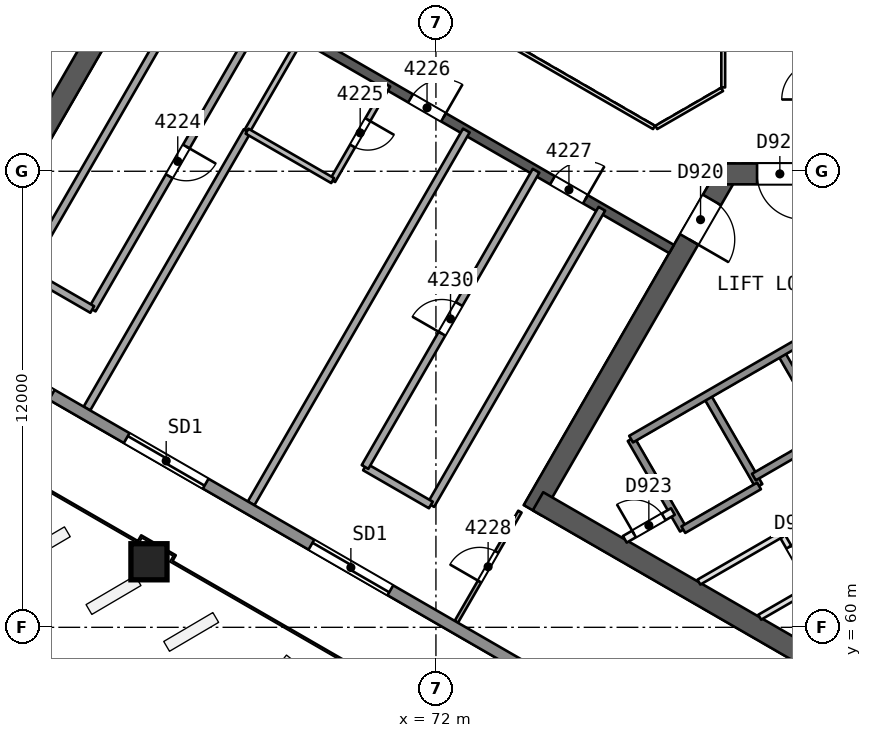
"""IFC4 building model, lengths in metres.
Left out: names, types, materials, properties, quantities, classifications, styles, units other than length and angle.
Written with IfcOpenShell. Run it as: python <this file> out.ifc"""

import sys

from ifc_helpers import new_model, si_unit, direction, frame, frame_2d, origin, origin_2d, place, context, subcontext, project, spatial, rectangle, extrude, element, fill, save


model = new_model("IFC4")
c1 = context("Model", 3, precision=1e-05, world=origin(), true_north=direction((0.0, 1.0)))
c2 = subcontext(c1, "Body", "Model", "MODEL_VIEW")
j1 = project(units=[si_unit("LENGTHUNIT", "METRE"), si_unit("PLANEANGLEUNIT", "RADIAN")], contexts=[c1])
p1 = place(None, origin())
s1 = spatial("IfcSite", under=j1, at=p1, CompositionType="ELEMENT")
p2 = place(p1, origin())
s2 = spatial("IfcBuilding", under=s1, at=p2, CompositionType="ELEMENT")
p3 = place(p2, frame((0.0, 0.0, 174.8)))
s3 = spatial("IfcBuildingStorey", under=s2, at=p3, CompositionType="ELEMENT", Elevation=174.8)
p4 = place(p3, frame((60.709, 71.386, 0.0), z_axis=(0.0, 0.0, 1.0), x_axis=(0.500015938302, 0.866016201606, 0.0)))
e1 = element("IfcWall", 1, at=p4, inside=s3, PredefinedType="SHEAR", context=c2, shape_type="SweptSolid", body=[
    extrude(rectangle(XDim=10.105, YDim=0.55, at=frame_2d((5.053, 0.0))), origin(), (0.0, 0.0, 1.0), 3.7),
])
p5 = place(p4, frame((7.955, 0.0, 0.0)))
e2 = element("IfcOpeningElement", 2, at=p5, cuts=e1, PredefinedType="OPENING", context=c2, shape_type="SweptSolid", body=[
    extrude(rectangle(XDim=1.2, YDim=2.1, at=frame_2d((0.6, 1.05))), frame((0.0, 0.286, 0.0), z_axis=(0.0, -1.0, 0.0), x_axis=(1.0, 0.0, 0.0)), (0.0, 0.0, 1.0), 0.571),
])
p6 = place(p3, frame((79.659, 71.931, 0.0), z_axis=(0.0, 0.0, 1.0), x_axis=(-0.500000202252, -0.866025287014, 0.0)))
e3 = element("IfcWall", 3, at=p6, inside=s3, PredefinedType="SHEAR", context=c2, shape_type="SweptSolid", body=[
    extrude(rectangle(XDim=10.221, YDim=0.55, at=frame_2d((5.111, 0.0))), origin(), (0.0, 0.0, 1.0), 3.7),
])
p7 = place(p6, frame((0.791, 0.0, 0.0)))
e4 = element("IfcOpeningElement", 4, at=p7, cuts=e3, PredefinedType="OPENING", context=c2, shape_type="SweptSolid", body=[
    extrude(rectangle(XDim=1.2, YDim=2.1, at=frame_2d((0.6, 1.05))), frame((0.0, 0.286, 0.0), z_axis=(0.0, -1.0, 0.0), x_axis=(1.0, 0.0, 0.0)), (0.0, 0.0, 1.0), 0.571),
])
p8 = place(p3, frame((74.686, 63.317, 0.0), z_axis=(0.0, 0.0, 1.0), x_axis=(0.866024505738, -0.500001555459, 0.0)))
e5 = element("IfcWall", 5, at=p8, inside=s3, PredefinedType="SHEAR", context=c2, shape_type="SweptSolid", body=[
    extrude(rectangle(XDim=14.059, YDim=0.55, at=frame_2d((7.029, 0.0))), origin(), (0.0, 0.0, 1.0), 3.7),
])
p9 = place(p3, frame((89.605, 71.931, 0.0), z_axis=(0.0, 0.0, 1.0), x_axis=(-1.0, 0.0, 0.0)))
e6 = element("IfcWall", 6, at=p9, inside=s3, PredefinedType="SHEAR", context=c2, shape_type="SweptSolid", body=[
    extrude(rectangle(XDim=10.105, YDim=0.55, at=frame_2d((5.052, 0.0))), origin(), (0.0, 0.0, 1.0), 3.7),
])
p10 = place(p9, frame((7.955, 0.0, 0.0)))
e7 = element("IfcOpeningElement", 7, at=p10, cuts=e6, PredefinedType="OPENING", context=c2, shape_type="SweptSolid", body=[
    extrude(rectangle(XDim=1.2, YDim=2.1, at=frame_2d((0.6, 1.05))), frame((0.0, 0.286, 0.0), z_axis=(0.0, -1.0, 0.0), x_axis=(1.0, 0.0, 0.0)), (0.0, 0.0, 1.0), 0.571),
])
p11 = place(p3, frame((64.7, 77.748, 0.0), z_axis=(0.0, 0.0, 1.0), x_axis=(0.866026492143, -0.499998114903, 0.0)))
e8 = element("IfcWall", 8, at=p11, inside=s3, PredefinedType="SHEAR", context=c2, shape_type="SweptSolid", body=[
    extrude(rectangle(XDim=15.588, YDim=0.25, at=frame_2d((7.794, 0.0))), origin(), (0.0, 0.0, 1.0), 3.25),
])
p12 = place(p11, frame((1.682, 0.0, 0.0)))
e9 = element("IfcOpeningElement", 9, at=p12, cuts=e8, PredefinedType="OPENING", context=c2, shape_type="SweptSolid", body=[
    extrude(rectangle(XDim=1.0, YDim=2.1, at=frame_2d((0.5, 1.05))), frame((0.0, 0.135, 0.0), z_axis=(0.0, -1.0, 0.0), x_axis=(1.0, 0.0, 0.0)), (0.0, 0.0, 1.0), 0.271),
])
p13 = place(p11, frame((7.659, 0.0, 0.0)))
e10 = element("IfcOpeningElement", 10, at=p13, cuts=e8, PredefinedType="OPENING", context=c2, shape_type="SweptSolid", body=[
    extrude(rectangle(XDim=1.0, YDim=2.1, at=frame_2d((0.5, 1.05))), frame((0.0, 0.135, 0.0), z_axis=(0.0, -1.0, 0.0), x_axis=(1.0, 0.0, 0.0)), (0.0, 0.0, 1.0), 0.271),
])
p14 = place(p11, frame((11.971, 0.0, 0.0)))
e11 = element("IfcOpeningElement", 11, at=p14, cuts=e8, PredefinedType="OPENING", context=c2, shape_type="SweptSolid", body=[
    extrude(rectangle(XDim=1.0, YDim=2.1, at=frame_2d((0.5, 1.05))), frame((0.0, 0.135, 0.0), z_axis=(0.0, -1.0, 0.0), x_axis=(1.0, 0.0, 0.0)), (0.0, 0.0, 1.0), 0.271),
])
p15 = place(p3, frame((64.437, 61.704, 0.0), z_axis=(0.010093620709, 0.017482414954, 0.999796221231), x_axis=(-0.866022643586, 0.500004780773, 1.3036e-08)))
e12 = element("IfcColumn", 12, at=p15, inside=s3, PredefinedType="COLUMN", context=c2, shape_type="SweptSolid", body=[
    extrude(rectangle(XDim=0.95, YDim=0.95, at=origin_2d()), origin(), (0.0, 0.0, 1.0), 3.701),
])
p16 = place(p3, frame((67.456, 76.157, 0.0), z_axis=(0.0, 0.0, 1.0), x_axis=(-0.499990139034, -0.866031096941, 0.0)))
e13 = element("IfcWall", 13, at=p16, inside=s3, PredefinedType="PARTITIONING", context=c2, shape_type="SweptSolid", body=[
    extrude(rectangle(XDim=9.0, YDim=0.2, at=frame_2d((4.5, 0.0))), origin(), (0.0, 0.0, 1.0), 3.25),
])
p17 = place(p16, frame((4.05, 0.0, 0.0)))
e14 = element("IfcOpeningElement", 14, at=p17, cuts=e13, PredefinedType="OPENING", context=c2, shape_type="SweptSolid", body=[
    extrude(rectangle(XDim=0.9, YDim=2.1, at=frame_2d((0.45, 1.05))), frame((0.0, 0.11, 0.0), z_axis=(0.0, -1.0, 0.0), x_axis=(1.0, 0.0, 0.0)), (0.0, 0.0, 1.0), 0.221),
])
p18 = place(p3, frame((62.956, 68.363, 0.0), z_axis=(0.0, 0.0, 1.0), x_axis=(-0.866041268327, 0.499972520799, 0.0)))
e15 = element("IfcWall", 15, at=p18, inside=s3, PredefinedType="PARTITIONING", context=c2, shape_type="SweptSolid", body=[
    extrude(rectangle(XDim=2.0, YDim=0.2, at=frame_2d((1.0, 0.0))), origin(), (0.0, 0.0, 1.0), 3.25),
])
p19 = place(p3, frame((61.224, 69.363, 0.0), z_axis=(0.0, 0.0, 1.0), x_axis=(0.499990139034, 0.866031096941, 0.0)))
e16 = element("IfcWall", 16, at=p19, inside=s3, PredefinedType="PARTITIONING", context=c2, shape_type="SweptSolid", body=[
    extrude(rectangle(XDim=9.0, YDim=0.2, at=frame_2d((4.5, 0.0))), origin(), (0.0, 0.0, 1.0), 3.25),
])
p20 = place(p3, frame((62.816, 65.756, 0.0), z_axis=(0.0, 0.0, 1.0), x_axis=(0.500002470373, 0.866023977509, 0.0)))
e17 = element("IfcWall", 17, at=p20, inside=s3, PredefinedType="PARTITIONING", context=c2, shape_type="SweptSolid", body=[
    extrude(rectangle(XDim=8.428, YDim=0.2, at=frame_2d((4.214, 0.0))), origin(), (0.0, 0.0, 1.0), 3.25),
])
p21 = place(p3, frame((67.03, 73.054, 0.0), z_axis=(0.0, 0.0, 1.0), x_axis=(0.499987231761, 0.866032775405, 0.0)))
e18 = element("IfcWall", 18, at=p21, inside=s3, PredefinedType="PARTITIONING", context=c2, shape_type="SweptSolid", body=[
    extrude(rectangle(XDim=2.9, YDim=0.15, at=frame_2d((1.45, 0.0))), origin(), (0.0, 0.0, 1.0), 3.25),
])
p22 = place(p3, frame((70.732, 74.266, 0.0), z_axis=(0.0, 0.0, 1.0), x_axis=(-0.499987231761, -0.866032775405, 0.0)))
e19 = element("IfcWall", 19, at=p22, inside=s3, PredefinedType="PARTITIONING", context=c2, shape_type="SweptSolid", body=[
    extrude(rectangle(XDim=2.9, YDim=0.15, at=frame_2d((1.45, 0.0))), origin(), (0.0, 0.0, 1.0), 3.25),
])
p23 = place(p22, frame((1.05, 0.0, 0.0)))
e20 = element("IfcOpeningElement", 20, at=p23, cuts=e19, PredefinedType="OPENING", context=c2, shape_type="SweptSolid", body=[
    extrude(rectangle(XDim=0.8, YDim=2.1, at=frame_2d((0.4, 1.05))), frame((0.0, 0.085, 0.0), z_axis=(0.0, -1.0, 0.0), x_axis=(1.0, 0.0, 0.0)), (0.0, 0.0, 1.0), 0.171),
])
p24 = place(p3, frame((69.282, 71.754, 0.0), z_axis=(0.0, 0.0, 1.0), x_axis=(-0.866021400173, 0.500006934395, 0.0)))
e21 = element("IfcWall", 21, at=p24, inside=s3, PredefinedType="PARTITIONING", context=c2, shape_type="SweptSolid", body=[
    extrude(rectangle(XDim=2.6, YDim=0.15, at=frame_2d((1.3, 0.0))), origin(), (0.0, 0.0, 1.0), 3.25),
])
p25 = place(p3, frame((67.136, 63.262, 0.0), z_axis=(0.0, 0.0, 1.0), x_axis=(0.499998569178, 0.866026229868, 0.0)))
e22 = element("IfcWall", 22, at=p25, inside=s3, PredefinedType="PARTITIONING", context=c2, shape_type="SweptSolid", body=[
    extrude(rectangle(XDim=11.328, YDim=0.2, at=frame_2d((5.664, 0.0))), origin(), (0.0, 0.0, 1.0), 3.25),
])
p26 = place(p3, frame((72.536, 60.144, 0.0), z_axis=(0.0, 0.0, 1.0), x_axis=(0.499981198768, 0.866036258409, 0.0)))
e23 = element("IfcWall", 23, at=p26, inside=s3, PredefinedType="PARTITIONING", context=c2, shape_type="SweptSolid", body=[
    extrude(rectangle(XDim=3.349, YDim=0.1, at=frame_2d((1.674, 0.0))), origin(), (0.0, 0.0, 1.0), 3.25),
])
p27 = place(p26, frame((1.224, 0.0, 0.0)))
e24 = element("IfcOpeningElement", 24, at=p27, cuts=e23, PredefinedType="OPENING", context=c2, shape_type="SweptSolid", body=[
    extrude(rectangle(XDim=0.9, YDim=2.1, at=frame_2d((0.45, 1.05))), frame((0.0, 0.061, 0.0), z_axis=(0.0, -1.0, 0.0), x_axis=(1.0, 0.0, 0.0)), (0.0, 0.0, 1.0), 0.121),
])
p28 = place(p3, frame((76.366, 71.013, 0.0), z_axis=(0.0, 0.0, 1.0), x_axis=(-0.5000018851, -0.866024315419, 0.0)))
e25 = element("IfcWall", 25, at=p28, inside=s3, PredefinedType="PARTITIONING", context=c2, shape_type="SweptSolid", body=[
    extrude(rectangle(XDim=9.0, YDim=0.2, at=frame_2d((4.5, 0.0))), origin(), (0.0, 0.0, 1.0), 3.25),
])
p29 = place(p3, frame((71.866, 63.219, 0.0), z_axis=(0.0, 0.0, 1.0), x_axis=(-0.866010750942, 0.50002537861, 0.0)))
e26 = element("IfcWall", 26, at=p29, inside=s3, PredefinedType="PARTITIONING", context=c2, shape_type="SweptSolid", body=[
    extrude(rectangle(XDim=2.0, YDim=0.2, at=frame_2d((1.0, 0.0))), origin(), (0.0, 0.0, 1.0), 3.25),
])
p30 = place(p3, frame((70.134, 64.219, 0.0), z_axis=(0.0, 0.0, 1.0), x_axis=(0.5000018851, 0.866024315419, 0.0)))
e27 = element("IfcWall", 27, at=p30, inside=s3, PredefinedType="PARTITIONING", context=c2, shape_type="SweptSolid", body=[
    extrude(rectangle(XDim=9.0, YDim=0.2, at=frame_2d((4.5, 0.0))), origin(), (0.0, 0.0, 1.0), 3.25),
])
p31 = place(p30, frame((4.05, 0.0, 0.0)))
e28 = element("IfcOpeningElement", 28, at=p31, cuts=e27, PredefinedType="OPENING", context=c2, shape_type="SweptSolid", body=[
    extrude(rectangle(XDim=0.9, YDim=2.1, at=frame_2d((0.45, 1.05))), frame((0.0, 0.11, 0.0), z_axis=(0.0, -1.0, 0.0), x_axis=(1.0, 0.0, 0.0)), (0.0, 0.0, 1.0), 0.221),
])
p32 = place(p3, frame((88.844, 50.557, 0.0), z_axis=(0.0, 0.0, 1.0), x_axis=(-0.866025382531, 0.500000036812, 0.0)))
e29 = element("IfcWall", 29, at=p32, inside=s3, PredefinedType="SOLIDWALL", context=c2, shape_type="SweptSolid", body=[
    extrude(rectangle(XDim=53.42, YDim=0.3, at=frame_2d((26.71, 0.0))), origin(), (0.0, 0.0, 1.0), 3.25),
])
p33 = place(p32, frame((31.122, 0.0, 0.0)))
e30 = element("IfcOpeningElement", 30, at=p33, cuts=e29, PredefinedType="OPENING", context=c2, shape_type="SweptSolid", body=[
    extrude(rectangle(XDim=2.4, YDim=2.4, at=frame_2d((1.2, 1.2))), frame((0.0, 0.161, 0.0), z_axis=(0.0, -1.0, 0.0), x_axis=(1.0, 0.0, 0.0)), (0.0, 0.0, 1.0), 0.321),
])
p34 = place(p32, frame((41.52, 0.0, 0.0)))
e31 = element("IfcOpeningElement", 31, at=p34, cuts=e29, PredefinedType="OPENING", context=c2, shape_type="SweptSolid", body=[
    extrude(rectangle(XDim=2.4, YDim=2.4, at=frame_2d((1.2, 1.2))), frame((0.0, 0.161, 0.0), z_axis=(0.0, -1.0, 0.0), x_axis=(1.0, 0.0, 0.0)), (0.0, 0.0, 1.0), 0.321),
])
p35 = place(p32, frame((20.834, 0.0, 0.0)))
e32 = element("IfcOpeningElement", 32, at=p35, cuts=e29, PredefinedType="OPENING", context=c2, shape_type="SweptSolid", body=[
    extrude(rectangle(XDim=2.4, YDim=2.4, at=frame_2d((1.2, 1.2))), frame((0.0, 0.161, 0.0), z_axis=(0.0, -1.0, 0.0), x_axis=(1.0, 0.0, 0.0)), (0.0, 0.0, 1.0), 0.321),
])
p36 = place(p32, frame((9.507, 0.0, 0.0)))
e33 = element("IfcOpeningElement", 33, at=p36, cuts=e29, PredefinedType="OPENING", context=c2, shape_type="SweptSolid", body=[
    extrude(rectangle(XDim=2.4, YDim=2.4, at=frame_2d((1.2, 1.2))), frame((0.0, 0.161, 0.0), z_axis=(0.0, -1.0, 0.0), x_axis=(1.0, 0.0, 0.0)), (0.0, 0.0, 1.0), 0.321),
])
p37 = place(p32, frame((26.446, 0.0, 0.0)))
e34 = element("IfcOpeningElement", 34, at=p37, cuts=e29, PredefinedType="OPENING", context=c2, shape_type="SweptSolid", body=[
    extrude(rectangle(XDim=2.4, YDim=2.4, at=frame_2d((1.2, 1.2))), frame((0.0, 0.161, 0.0), z_axis=(0.0, -1.0, 0.0), x_axis=(1.0, 0.0, 0.0)), (0.0, 0.0, 1.0), 0.321),
])
p38 = place(p3, frame((77.135, 64.952, 0.0), z_axis=(0.0, 0.0, 1.0), x_axis=(0.499996545922, -0.866027397988, 0.0)))
e35 = element("IfcWall", 35, at=p38, inside=s3, PredefinedType="SOLIDWALL", context=c2, shape_type="SweptSolid", body=[
    extrude(rectangle(XDim=2.75, YDim=0.2, at=frame_2d((1.375, 0.0))), origin(), (0.0, 0.0, 1.0), 3.25),
])
p39 = place(p3, frame((81.094, 62.445, 0.0), z_axis=(0.0, 0.0, 1.0), x_axis=(0.499880961361, -0.866094119867, 0.0)))
e36 = element("IfcWall", 36, at=p39, inside=s3, PredefinedType="PARTITIONING", context=c2, shape_type="SweptSolid", body=[
    extrude(rectangle(XDim=1.6, YDim=0.15, at=frame_2d((0.8, 0.0))), origin(), (0.0, 0.0, 1.0), 3.25),
])
p40 = place(p39, frame((0.387, 0.0, 0.0)))
e37 = element("IfcOpeningElement", 37, at=p40, cuts=e36, PredefinedType="OPENING", context=c2, shape_type="SweptSolid", body=[
    extrude(rectangle(XDim=0.9, YDim=2.1, at=frame_2d((0.45, 1.05))), frame((0.0, 0.085, 0.0), z_axis=(0.0, -1.0, 0.0), x_axis=(1.0, 0.0, 0.0)), (0.0, 0.0, 1.0), 0.171),
])
p41 = place(p3, frame((79.127, 66.102, 0.0), z_axis=(0.0, 0.0, 1.0), x_axis=(0.499996545922, -0.866027397988, 0.0)))
e38 = element("IfcWall", 38, at=p41, inside=s3, PredefinedType="SOLIDWALL", context=c2, shape_type="SweptSolid", body=[
    extrude(rectangle(XDim=2.75, YDim=0.2, at=frame_2d((1.375, 0.0))), origin(), (0.0, 0.0, 1.0), 3.25),
])
p42 = place(p3, frame((81.076, 67.227, 0.0), z_axis=(0.0, 0.0, 1.0), x_axis=(0.50000366821, -0.866023285932, 0.0)))
e39 = element("IfcWall", 39, at=p42, inside=s3, PredefinedType="SOLIDWALL", context=c2, shape_type="SweptSolid", body=[
    extrude(rectangle(XDim=2.48, YDim=0.2, at=frame_2d((1.24, 0.0))), origin(), (0.0, 0.0, 1.0), 3.25),
])
p43 = place(p3, frame((77.135, 64.952, 0.0), z_axis=(0.0, 0.0, 1.0), x_axis=(0.866031916153, 0.499988720078, 0.0)))
e40 = element("IfcWall", 40, at=p43, inside=s3, PredefinedType="SOLIDWALL", context=c2, shape_type="SweptSolid", body=[
    extrude(rectangle(XDim=11.35, YDim=0.2, at=frame_2d((5.675, 0.0))), origin(), (0.0, 0.0, 1.0), 3.25),
])
p44 = place(p3, frame((76.97, 62.316, 0.0), z_axis=(0.0, 0.0, 1.0), x_axis=(0.865982457891, 0.500074377092, 0.0)))
e41 = element("IfcWall", 41, at=p44, inside=s3, PredefinedType="PARTITIONING", context=c2, shape_type="SweptSolid", body=[
    extrude(rectangle(XDim=1.461, YDim=0.2, at=frame_2d((0.73, 0.0))), origin(), (0.0, 0.0, 1.0), 3.25),
])
p45 = place(p44, frame((0.281, 0.0, 0.0)))
e42 = element("IfcOpeningElement", 42, at=p45, cuts=e41, PredefinedType="OPENING", context=c2, shape_type="SweptSolid", body=[
    extrude(rectangle(XDim=0.9, YDim=2.1, at=frame_2d((0.45, 1.05))), frame((0.0, 0.11, 0.0), z_axis=(0.0, -1.0, 0.0), x_axis=(1.0, 0.0, 0.0)), (0.0, 0.0, 1.0), 0.221),
])
p46 = place(p3, frame((80.367, 63.954, 0.0), z_axis=(0.0, 0.0, 1.0), x_axis=(0.866026575979, 0.499997969693, 0.0)))
e43 = element("IfcWall", 43, at=p46, inside=s3, PredefinedType="SOLIDWALL", context=c2, shape_type="SweptSolid", body=[
    extrude(rectangle(XDim=6.75, YDim=0.2, at=frame_2d((3.375, 0.0))), origin(), (0.0, 0.0, 1.0), 3.25),
])
p47 = place(p3, frame((78.51, 62.57, 0.0), z_axis=(0.0, 0.0, 1.0), x_axis=(0.866053019151, 0.499952165731, 0.0)))
e44 = element("IfcWall", 44, at=p47, inside=s3, PredefinedType="SOLIDWALL", context=c2, shape_type="SweptSolid", body=[
    extrude(rectangle(XDim=2.3, YDim=0.2, at=frame_2d((1.15, 0.0))), origin(), (0.0, 0.0, 1.0), 3.25),
])
p48 = place(p3, frame((78.92, 61.19, 0.0), z_axis=(0.0, 0.0, 1.0), x_axis=(0.866038211682, 0.499977815414, 0.0)))
e45 = element("IfcWall", 45, at=p48, inside=s3, PredefinedType="PARTITIONING", context=c2, shape_type="SweptSolid", body=[
    extrude(rectangle(XDim=2.51, YDim=0.15, at=frame_2d((1.255, 0.0))), origin(), (0.0, 0.0, 1.0), 3.25),
])
p49 = place(p3, frame((80.52, 60.266, 0.0), z_axis=(0.0, 0.0, 1.0), x_axis=(0.866008740531, 0.500028860491, 0.0)))
e46 = element("IfcWall", 46, at=p49, inside=s3, PredefinedType="PARTITIONING", context=c2, shape_type="SweptSolid", body=[
    extrude(rectangle(XDim=1.586, YDim=0.15, at=frame_2d((0.793, 0.0))), origin(), (0.0, 0.0, 1.0), 3.25),
])
for number, where, z_axis, x_axis in (
    (47, (79.56, 74.206, 0.0), (0.0, 0.0, 1.0), (0.0, 1.0, 0.0)),
    (48, (67.702, 78.948, 0.0), (0.0, 0.0, 1.0), (0.866, -0.5, 0.0)),
):
    element("IfcWall", number, at=place(p3, frame(where, z_axis=z_axis, x_axis=x_axis)), inside=s3, PredefinedType="PARTITIONING", context=c2, shape_type="SweptSolid", body=[
        extrude(rectangle(XDim=11.588, YDim=0.1, at=frame_2d((5.794, 0.0))), origin(), (0.0, 0.0, 1.0), 3.25),
    ])
p50 = place(p3, frame((77.798, 73.154, 0.0), z_axis=(0.0, 0.0, 1.0), x_axis=(0.866041268327, 0.499972520799, 0.0)))
e49 = element("IfcWall", 49, at=p50, inside=s3, PredefinedType="PARTITIONING", context=c2, shape_type="SweptSolid", body=[
    extrude(rectangle(XDim=2.0, YDim=0.1, at=frame_2d((1.0, 0.0))), origin(), (0.0, 0.0, 1.0), 3.25),
])
p51 = place(p17, origin())
e50 = element("IfcDoor", 50, at=p51, inside=s3, OperationType="SINGLE_SWING_LEFT", PredefinedType="NOTDEFINED", context=c2, shape_type="SweptSolid", body=[
    extrude(rectangle(XDim=0.9, YDim=2.1, at=frame_2d((0.45, 1.05))), frame((0.0, 0.025, 0.0), z_axis=(0.0, -1.0, 0.0), x_axis=(1.0, 0.0, 0.0)), (0.0, 0.0, 1.0), 0.05),
])
fill(e14, e50)
p52 = place(p23, origin())
e51 = element("IfcDoor", 51, at=p52, inside=s3, OperationType="SINGLE_SWING_LEFT", PredefinedType="NOTDEFINED", context=c2, shape_type="SweptSolid", body=[
    extrude(rectangle(XDim=0.8, YDim=2.1, at=frame_2d((0.4, 1.05))), frame((0.0, 0.025, 0.0), z_axis=(0.0, -1.0, 0.0), x_axis=(1.0, 0.0, 0.0)), (0.0, 0.0, 1.0), 0.05),
])
fill(e20, e51)
p53 = place(p13, origin())
e52 = element("IfcDoor", 52, at=p53, inside=s3, OperationType="SINGLE_SWING_RIGHT", PredefinedType="NOTDEFINED", context=c2, shape_type="SweptSolid", body=[
    extrude(rectangle(XDim=1.0, YDim=2.1, at=frame_2d((0.5, 1.05))), frame((0.0, 0.025, 0.0), z_axis=(0.0, -1.0, 0.0), x_axis=(1.0, 0.0, 0.0)), (0.0, 0.0, 1.0), 0.05),
])
fill(e10, e52)
p54 = place(p14, origin())
e53 = element("IfcDoor", 53, at=p54, inside=s3, OperationType="SINGLE_SWING_RIGHT", PredefinedType="NOTDEFINED", context=c2, shape_type="SweptSolid", body=[
    extrude(rectangle(XDim=1.0, YDim=2.1, at=frame_2d((0.5, 1.05))), frame((0.0, 0.025, 0.0), z_axis=(0.0, -1.0, 0.0), x_axis=(1.0, 0.0, 0.0)), (0.0, 0.0, 1.0), 0.05),
])
fill(e11, e53)
p55 = place(p27, origin())
e54 = element("IfcDoor", 54, at=p55, inside=s3, OperationType="SINGLE_SWING_LEFT", PredefinedType="NOTDEFINED", context=c2, shape_type="SweptSolid", body=[
    extrude(rectangle(XDim=0.9, YDim=2.1, at=frame_2d((0.45, 1.05))), frame((0.0, 0.025, 0.0), z_axis=(0.0, -1.0, 0.0), x_axis=(1.0, 0.0, 0.0)), (0.0, 0.0, 1.0), 0.05),
])
fill(e24, e54)
p56 = place(p31, origin())
e55 = element("IfcDoor", 55, at=p56, inside=s3, OperationType="SINGLE_SWING_LEFT", PredefinedType="NOTDEFINED", context=c2, shape_type="SweptSolid", body=[
    extrude(rectangle(XDim=0.9, YDim=2.1, at=frame_2d((0.45, 1.05))), frame((0.0, 0.025, 0.0), z_axis=(0.0, -1.0, 0.0), x_axis=(1.0, 0.0, 0.0)), (0.0, 0.0, 1.0), 0.05),
])
fill(e28, e55)
p57 = place(p35, origin())
e56 = element("IfcDoor", 56, at=p57, inside=s3, OperationType="SLIDING_TO_LEFT", PredefinedType="NOTDEFINED", context=c2, shape_type="SweptSolid", body=[
    extrude(rectangle(XDim=2.4, YDim=2.4, at=frame_2d((1.2, 1.2))), frame((0.0, 0.025, 0.0), z_axis=(0.0, -1.0, 0.0), x_axis=(1.0, 0.0, 0.0)), (0.0, 0.0, 1.0), 0.05),
])
fill(e32, e56)
p58 = place(p37, origin())
e57 = element("IfcDoor", 57, at=p58, inside=s3, OperationType="SLIDING_TO_LEFT", PredefinedType="NOTDEFINED", context=c2, shape_type="SweptSolid", body=[
    extrude(rectangle(XDim=2.4, YDim=2.4, at=frame_2d((1.2, 1.2))), frame((0.0, 0.025, 0.0), z_axis=(0.0, -1.0, 0.0), x_axis=(1.0, 0.0, 0.0)), (0.0, 0.0, 1.0), 0.05),
])
fill(e34, e57)
p59 = place(p7, origin())
e58 = element("IfcDoor", 58, at=p59, inside=s3, OperationType="SINGLE_SWING_RIGHT", PredefinedType="NOTDEFINED", context=c2, shape_type="SweptSolid", body=[
    extrude(rectangle(XDim=1.2, YDim=2.1, at=frame_2d((0.6, 1.05))), frame((0.0, 0.025, 0.0), z_axis=(0.0, -1.0, 0.0), x_axis=(1.0, 0.0, 0.0)), (0.0, 0.0, 1.0), 0.05),
])
fill(e4, e58)
p60 = place(p10, origin())
e59 = element("IfcDoor", 59, at=p60, inside=s3, OperationType="SINGLE_SWING_LEFT", PredefinedType="NOTDEFINED", context=c2, shape_type="SweptSolid", body=[
    extrude(rectangle(XDim=1.2, YDim=2.1, at=frame_2d((0.6, 1.05))), frame((0.0, 0.025, 0.0), z_axis=(0.0, -1.0, 0.0), x_axis=(1.0, 0.0, 0.0)), (0.0, 0.0, 1.0), 0.05),
])
fill(e7, e59)
p61 = place(p45, origin())
e60 = element("IfcDoor", 60, at=p61, inside=s3, OperationType="SINGLE_SWING_LEFT", PredefinedType="NOTDEFINED", context=c2, shape_type="SweptSolid", body=[
    extrude(rectangle(XDim=0.9, YDim=2.1, at=frame_2d((0.45, 1.05))), frame((0.0, 0.025, 0.0), z_axis=(0.0, -1.0, 0.0), x_axis=(1.0, 0.0, 0.0)), (0.0, 0.0, 1.0), 0.05),
])
fill(e42, e60)
p62 = place(p40, origin())
e61 = element("IfcDoor", 61, at=p62, inside=s3, OperationType="SINGLE_SWING_LEFT", PredefinedType="NOTDEFINED", context=c2, shape_type="SweptSolid", body=[
    extrude(rectangle(XDim=0.9, YDim=2.1, at=frame_2d((0.45, 1.05))), frame((0.0, 0.025, 0.0), z_axis=(0.0, -1.0, 0.0), x_axis=(1.0, 0.0, 0.0)), (0.0, 0.0, 1.0), 0.05),
])
fill(e37, e61)
save(model, sys.argv[1])
